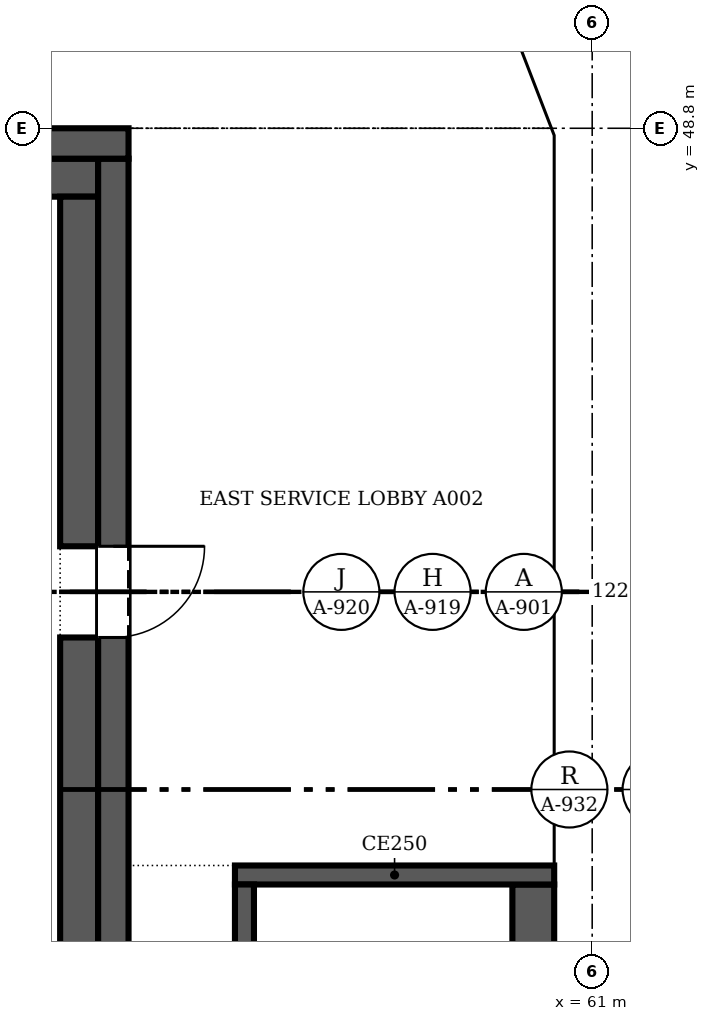
"""IFC4 building model, lengths in metres.
Left out: names, types, materials, properties, quantities, classifications, styles, units other than length and angle.
Written with IfcOpenShell. Run it as: python <this file> out.ifc"""

import sys

from ifc_helpers import new_model, si_unit, direction, frame, frame_2d, origin, place, context, subcontext, project, spatial, polyline, rectangle, outline, extrude, faceted_brep, source, transform, mapped, element, fill, save


model = new_model("IFC4")
c1 = context("Model", 3, precision=1e-05, world=origin(), true_north=direction((0.0, 1.0)))
c2 = subcontext(c1, "Body", "Model", "MODEL_VIEW")
j1 = project(units=[si_unit("LENGTHUNIT", "METRE"), si_unit("PLANEANGLEUNIT", "RADIAN")], contexts=[c1])
p1 = place(None, origin())
s1 = spatial("IfcSite", under=j1, at=p1, CompositionType="ELEMENT")
p2 = place(p1, origin())
s2 = spatial("IfcBuilding", under=s1, at=p2, CompositionType="ELEMENT")
p3 = place(p2, frame((0.0, 0.0, 248.3)))
s3 = spatial("IfcBuildingStorey", under=s2, at=p3, CompositionType="ELEMENT", Elevation=248.3)
m1 = source(origin(), c2, "Body", "Brep", [
    faceted_brep([(3.05, -0.25, 0.0), (6.1, -0.25, 3.8), (6.1, -0.25, 3.8), (3.05, -0.25, 7.6), (0.0, -0.25, 3.8), (0.0, 0.25, 3.8), (3.05, 0.25, 7.6), (6.1, 0.25, 3.8), (6.1, 0.25, 3.8), (3.05, 0.25, 0.0)], [[[0, 1, 2, 3, 4]], [[5, 6, 7, 8, 9]], [[9, 8, 1, 0]], [[7, 6, 3, 2]], [[6, 5, 4, 3]], [[5, 9, 0, 4]], [[1, 8, 7, 2]]]),
])
p4 = place(p3, frame((60.75, 33.55, -3.8), z_axis=(0.0, 0.0, 1.0), x_axis=(0.0, 1.0, 0.0)))
e1 = element("IfcWall", 1, at=p4, inside=s3, PredefinedType="SOLIDWALL", context=c2, shape_type="MappedRepresentation", body=[
    mapped(m1, transform((0.0, 0.0, 0.0), scale=1.0)),
])
m2 = source(origin(), c2, "Body", "SweptSolid", [
    extrude(outline(polyline([(3.05, 0.399), (5.78, 3.8), (3.05, 7.201), (0.321, 3.8), (3.05, 0.399)])), frame((0.0, 0.26, 0.0), z_axis=(0.0, -1.0, 0.0), x_axis=(1.0, 0.0, 0.0)), (0.0, 0.0, 1.0), 0.52),
])
p5 = place(p4, origin())
e2 = element("IfcOpeningElement", 2, at=p5, cuts=e1, PredefinedType="OPENING", context=c2, shape_type="MappedRepresentation", body=[
    mapped(m2, transform((0.0, 0.0, 0.0), scale=1.0)),
])
m3 = source(origin(), c2, "Body", "SweptSolid", [
    extrude(outline(polyline([(3.05, 0.0), (6.1, 3.8), (3.05, 7.6), (0.0, 3.8), (3.05, 0.0)])), frame((0.0, 0.25, 0.0), z_axis=(0.0, -1.0, 0.0), x_axis=(1.0, 0.0, 0.0)), (0.0, 0.0, 1.0), 0.5),
])
p6 = place(p3, frame((60.75, 39.65, -3.8), z_axis=(0.0, 0.0, 1.0), x_axis=(0.0, 1.0, 0.0)))
e3 = element("IfcWall", 3, at=p6, inside=s3, PredefinedType="SOLIDWALL", context=c2, shape_type="MappedRepresentation", body=[
    mapped(m3, transform((0.0, 0.0, 0.0), scale=1.0)),
])
p7 = place(p6, origin())
e4 = element("IfcOpeningElement", 4, at=p7, cuts=e3, PredefinedType="OPENING", context=c2, shape_type="MappedRepresentation", body=[
    mapped(m2, transform((0.0, 0.0, 0.0), scale=1.0)),
])
m4 = source(origin(), c2, "Body", "Brep", [
    faceted_brep([(3.003, -0.25, 0.0), (3.05, -0.25, 0.06), (3.05, -0.25, 7.54), (3.003, -0.25, 7.6), (0.0, -0.25, 3.8), (0.0, 0.25, 3.8), (2.957, 0.25, 7.541), (2.957, 0.25, 0.059), (3.003, 0.0, 0.0), (3.003, 0.0, 7.6)], [[[0, 1, 2, 3, 4]], [[5, 6, 7]], [[1, 0, 8]], [[9, 3, 2]], [[6, 5, 4, 3, 9]], [[5, 7, 8, 0, 4]], [[1, 8, 7, 6, 9, 2]]]),
])
p8 = place(p3, frame((60.75, 45.75, -3.8), z_axis=(0.0, 0.0, 1.0), x_axis=(0.0, 1.0, 0.0)))
e5 = element("IfcWall", 5, at=p8, inside=s3, PredefinedType="SOLIDWALL", context=c2, shape_type="MappedRepresentation", body=[
    mapped(m4, transform((0.0, 0.0, 0.0), scale=1.0)),
])
m5 = source(origin(), c2, "Body", "SweptSolid", [
    extrude(outline(polyline([(2.803, 6.944), (0.319, 3.8), (2.803, 0.656), (2.803, 6.944)])), frame((0.0, 0.26, 0.0), z_axis=(0.0, -1.0, 0.0), x_axis=(1.0, 0.0, 0.0)), (0.0, 0.0, 1.0), 0.52),
])
p9 = place(p8, origin())
e6 = element("IfcOpeningElement", 6, at=p9, cuts=e5, PredefinedType="OPENING", context=c2, shape_type="MappedRepresentation", body=[
    mapped(m5, transform((0.0, 0.0, 0.0), scale=1.0)),
])
m6 = source(origin(), c2, "Body", "Brep", [
    faceted_brep([(0.047, -0.25, 0.0), (2.997, -0.25, 3.8), (0.047, -0.25, 7.6), (0.0, -0.25, 7.541), (0.0, -0.25, 0.059), (0.093, 0.25, 7.54), (2.944, 0.25, 3.868), (2.944, 0.25, 3.732), (0.093, 0.25, 0.06), (2.997, 0.0, 3.8), (0.047, 0.0, 0.0), (0.047, 0.0, 7.6)], [[[0, 1, 2, 3, 4]], [[5, 6, 7, 8]], [[8, 7, 9, 1, 0, 10]], [[6, 5, 11, 2, 1, 9]], [[3, 2, 11]], [[10, 0, 4]], [[8, 10, 4, 3, 11, 5]], [[9, 7, 6]]]),
])
p10 = place(p3, frame((60.767, 48.71, -3.8), z_axis=(0.0, 0.0, 1.0), x_axis=(-0.359901446078, 0.932990326376, 0.0)))
e7 = element("IfcWall", 7, at=p10, inside=s3, PredefinedType="SOLIDWALL", context=c2, shape_type="MappedRepresentation", body=[
    mapped(m6, transform((0.0, 0.0, 0.0), scale=1.0)),
])
m7 = source(origin(), c2, "Body", "SweptSolid", [
    extrude(outline(polyline([(0.247, 0.665), (2.681, 3.8), (0.247, 6.935), (0.247, 0.665)])), frame((0.0, 0.26, 0.0), z_axis=(0.0, -1.0, 0.0), x_axis=(1.0, 0.0, 0.0)), (0.0, 0.0, 1.0), 0.52),
])
p11 = place(p10, origin())
e8 = element("IfcOpeningElement", 8, at=p11, cuts=e7, PredefinedType="OPENING", context=c2, shape_type="MappedRepresentation", body=[
    mapped(m7, transform((0.0, 0.0, 0.0), scale=1.0)),
])
p12 = place(p2, frame((0.0, 0.0, 252.1)))
s4 = spatial("IfcBuildingStorey", under=s2, at=p12, CompositionType="ELEMENT", Elevation=252.1)
m8 = source(origin(), c2, "Body", "Brep", [
    faceted_brep([(3.05, -0.25, 0.0), (6.1, -0.25, 3.8), (6.1, -0.25, 3.8), (3.05, -0.25, 7.6), (0.0, -0.25, 3.8), (0.0, 0.25, 3.8), (3.05, 0.25, 7.6), (6.1, 0.25, 3.8), (6.1, 0.25, 3.8), (3.05, 0.25, 0.0)], [[[0, 1, 2, 3, 4]], [[5, 6, 7, 8, 9]], [[9, 8, 1, 0]], [[7, 6, 3, 2]], [[6, 5, 4, 3]], [[5, 9, 0, 4]], [[1, 8, 7, 2]]]),
])
p13 = place(p12, frame((60.75, 36.6, -3.8), z_axis=(0.0, 0.0, 1.0), x_axis=(0.0, 1.0, 0.0)))
e9 = element("IfcWall", 9, at=p13, inside=s4, PredefinedType="SOLIDWALL", context=c2, shape_type="MappedRepresentation", body=[
    mapped(m8, transform((0.0, 0.0, 0.0), scale=1.0)),
])
m9 = source(origin(), c2, "Body", "SweptSolid", [
    extrude(outline(polyline([(3.05, 0.399), (5.78, 3.8), (3.05, 7.2), (0.321, 3.8), (3.05, 0.399)])), frame((0.0, 0.26, 0.0), z_axis=(0.0, -1.0, 0.0), x_axis=(1.0, 0.0, 0.0)), (0.0, 0.0, 1.0), 0.52),
])
p14 = place(p13, origin())
e10 = element("IfcOpeningElement", 10, at=p14, cuts=e9, PredefinedType="OPENING", context=c2, shape_type="MappedRepresentation", body=[
    mapped(m9, transform((0.0, 0.0, 0.0), scale=1.0)),
])
m10 = source(origin(), c2, "Body", "Brep", [
    faceted_brep([(3.05, -0.25, 0.0), (6.053, -0.25, 3.8), (3.05, -0.25, 7.6), (0.0, -0.25, 3.8), (0.0, 0.25, 3.8), (3.05, 0.25, 7.6), (6.007, 0.25, 3.859), (6.007, 0.25, 3.741), (3.05, 0.25, 0.0), (6.053, 0.0, 3.8)], [[[0, 1, 2, 3]], [[4, 5, 6, 7, 8]], [[8, 7, 9, 1, 0]], [[6, 5, 2, 1, 9]], [[5, 4, 3, 2]], [[4, 8, 0, 3]], [[7, 6, 9]]]),
])
p15 = place(p12, frame((60.75, 42.7, -3.8), z_axis=(0.0, 0.0, 1.0), x_axis=(0.0, 1.0, 0.0)))
e11 = element("IfcWall", 11, at=p15, inside=s4, PredefinedType="SOLIDWALL", context=c2, shape_type="MappedRepresentation", body=[
    mapped(m10, transform((0.0, 0.0, 0.0), scale=1.0)),
])
m11 = source(origin(), c2, "Body", "SweptSolid", [
    extrude(outline(polyline([(3.049, 0.401), (5.735, 3.8), (3.049, 7.199), (0.321, 3.8), (3.049, 0.401)])), frame((0.0, 0.26, 0.0), z_axis=(0.0, -1.0, 0.0), x_axis=(1.0, 0.0, 0.0)), (0.0, 0.0, 1.0), 0.52),
])
p16 = place(p15, origin())
e12 = element("IfcOpeningElement", 12, at=p16, cuts=e11, PredefinedType="OPENING", context=c2, shape_type="MappedRepresentation", body=[
    mapped(m11, transform((0.0, 0.0, 0.0), scale=1.0)),
])
m12 = source(origin(), c2, "Body", "Brep", [
    faceted_brep([(2.95, -0.25, 0.0), (3.003, -0.25, 0.068), (3.003, -0.25, 7.531), (2.95, -0.25, 7.6), (0.0, -0.25, 3.8), (0.047, 0.25, 3.86), (2.898, 0.25, 7.532), (2.898, 0.25, 0.068), (0.047, 0.25, 3.74), (2.95, 0.0, 0.0), (2.95, 0.0, 7.6), (0.0, 0.0, 3.8)], [[[0, 1, 2, 3, 4]], [[5, 6, 7, 8]], [[1, 0, 9]], [[10, 3, 2]], [[6, 5, 11, 4, 3, 10]], [[8, 7, 9, 0, 4, 11]], [[8, 11, 5]], [[1, 9, 7, 6, 10, 2]]]),
])
p17 = place(p12, frame((60.75, 48.753, -3.8), z_axis=(0.0, 0.0, 1.0), x_axis=(-0.35992665181, 0.932980602862, 0.0)))
e13 = element("IfcWall", 13, at=p17, inside=s4, PredefinedType="SOLIDWALL", context=c2, shape_type="MappedRepresentation", body=[
    mapped(m12, transform((0.0, 0.0, 0.0), scale=1.0)),
])
m13 = source(origin(), c2, "Body", "SweptSolid", [
    extrude(outline(polyline([(2.75, 6.935), (0.316, 3.8), (2.75, 0.665), (2.75, 6.935)])), frame((0.0, 0.26, 0.0), z_axis=(0.0, -1.0, 0.0), x_axis=(1.0, 0.0, 0.0)), (0.0, 0.0, 1.0), 0.52),
])
p18 = place(p17, origin())
e14 = element("IfcOpeningElement", 14, at=p18, cuts=e13, PredefinedType="OPENING", context=c2, shape_type="MappedRepresentation", body=[
    mapped(m13, transform((0.0, 0.0, 0.0), scale=1.0)),
])
p19 = place(p3, frame((30.5, 48.6, 0.0), z_axis=(0.0, 0.0, 1.0), x_axis=(1.0, 0.0, 0.0)))
e15 = element("IfcWall", 15, at=p19, inside=s3, PredefinedType="SHEAR", context=c2, shape_type="SweptSolid", body=[
    extrude(rectangle(XDim=24.4, YDim=0.4, at=frame_2d((12.2, 0.0))), origin(), (0.0, 0.0, 1.0), 3.8),
])
p20 = place(p3, frame((54.7, 48.4, 0.0), z_axis=(0.0, 0.0, 1.0), x_axis=(0.0, -1.0, 0.0)))
e16 = element("IfcWall", 16, at=p20, inside=s3, PredefinedType="SHEAR", context=c2, shape_type="SweptSolid", body=[
    extrude(rectangle(XDim=23.6, YDim=0.4, at=frame_2d((11.8, 0.0))), origin(), (0.0, 0.0, 1.0), 3.8),
])
m14 = source(origin(), c2, "Body", "SweptSolid", [
    extrude(rectangle(XDim=1.2, YDim=2.1, at=frame_2d((0.6, 1.05))), frame((0.0, 0.21, 0.0), z_axis=(0.0, -1.0, 0.0), x_axis=(1.0, 0.0, 0.0)), (0.0, 0.0, 1.0), 0.42),
])
p21 = place(p20, frame((5.1, 0.0, 0.0)))
e17 = element("IfcOpeningElement", 17, at=p21, cuts=e16, PredefinedType="OPENING", context=c2, shape_type="MappedRepresentation", body=[
    mapped(m14, transform((0.0, 0.0, 0.0), scale=1.0)),
])
p22 = place(p3, frame((30.9, 48.15, 0.0), z_axis=(0.0, 0.0, 1.0), x_axis=(1.0, 0.0, 0.0)))
e18 = element("IfcWall", 18, at=p22, inside=s3, PredefinedType="SOLIDWALL", context=c2, shape_type="SweptSolid", body=[
    extrude(rectangle(XDim=23.6, YDim=0.5, at=frame_2d((11.8, 0.0))), origin(), (0.0, 0.0, 1.0), 3.8),
])
p23 = place(p3, frame((54.25, 36.88, 0.0), z_axis=(0.0, 0.0, 1.0), x_axis=(0.0, 1.0, 0.0)))
e19 = element("IfcWall", 19, at=p23, inside=s3, PredefinedType="SOLIDWALL", context=c2, shape_type="SweptSolid", body=[
    extrude(rectangle(XDim=5.22, YDim=0.5, at=frame_2d((2.61, 0.0))), origin(), (0.0, 0.0, 1.0), 3.8),
])
p24 = place(p3, frame((54.25, 43.3, 0.0), z_axis=(0.0, 0.0, 1.0), x_axis=(0.0, 1.0, 0.0)))
e20 = element("IfcWall", 20, at=p24, inside=s3, PredefinedType="SOLIDWALL", context=c2, shape_type="SweptSolid", body=[
    extrude(rectangle(XDim=4.6, YDim=0.5, at=frame_2d((2.3, 0.0))), origin(), (0.0, 0.0, 1.0), 3.8),
])
p25 = place(p3, frame((56.425, 30.85, 0.0), z_axis=(0.0, 0.0, 1.0), x_axis=(0.0, 1.0, 0.0)))
e21 = element("IfcWall", 21, at=p25, inside=s3, PredefinedType="SOLIDWALL", context=c2, shape_type="SweptSolid", body=[
    extrude(rectangle(XDim=8.0, YDim=0.25, at=frame_2d((4.0, 0.0))), origin(), (0.0, 0.0, 1.0), 3.8),
])
p26 = place(p3, frame((56.3, 38.975, 0.0), z_axis=(0.0, 0.0, 1.0), x_axis=(1.0, 0.0, 0.0)))
e22 = element("IfcWall", 22, at=p26, inside=s3, PredefinedType="SOLIDWALL", context=c2, shape_type="SweptSolid", body=[
    extrude(rectangle(XDim=4.2, YDim=0.25, at=frame_2d((2.1, 0.0))), origin(), (0.0, 0.0, 1.0), 3.8),
])
p27 = place(p3, frame((60.225, 38.85, 0.0), z_axis=(0.0, 0.0, 1.0), x_axis=(0.0, -1.0, 0.0)))
e23 = element("IfcWall", 23, at=p27, inside=s3, PredefinedType="SOLIDWALL", context=c2, shape_type="SweptSolid", body=[
    extrude(rectangle(XDim=8.0, YDim=0.55, at=frame_2d((4.0, 0.0))), origin(), (0.0, 0.0, 1.0), 3.8),
])
m15 = source(origin(), c2, "Body", "SweptSolid", [
    extrude(rectangle(XDim=1.2, YDim=2.1, at=frame_2d((0.6, 1.05))), frame((0.0, 0.025, 0.0), z_axis=(0.0, -1.0, 0.0), x_axis=(1.0, 0.0, 0.0)), (0.0, 0.0, 1.0), 0.05),
])
p28 = place(p21, origin())
e24 = element("IfcDoor", 24, at=p28, inside=s3, OperationType="SINGLE_SWING_LEFT", PredefinedType="DOOR", context=c2, shape_type="MappedRepresentation", body=[
    mapped(m15, transform((0.0, 0.0, 0.0), scale=1.0)),
])
fill(e17, e24)
save(model, sys.argv[1])
